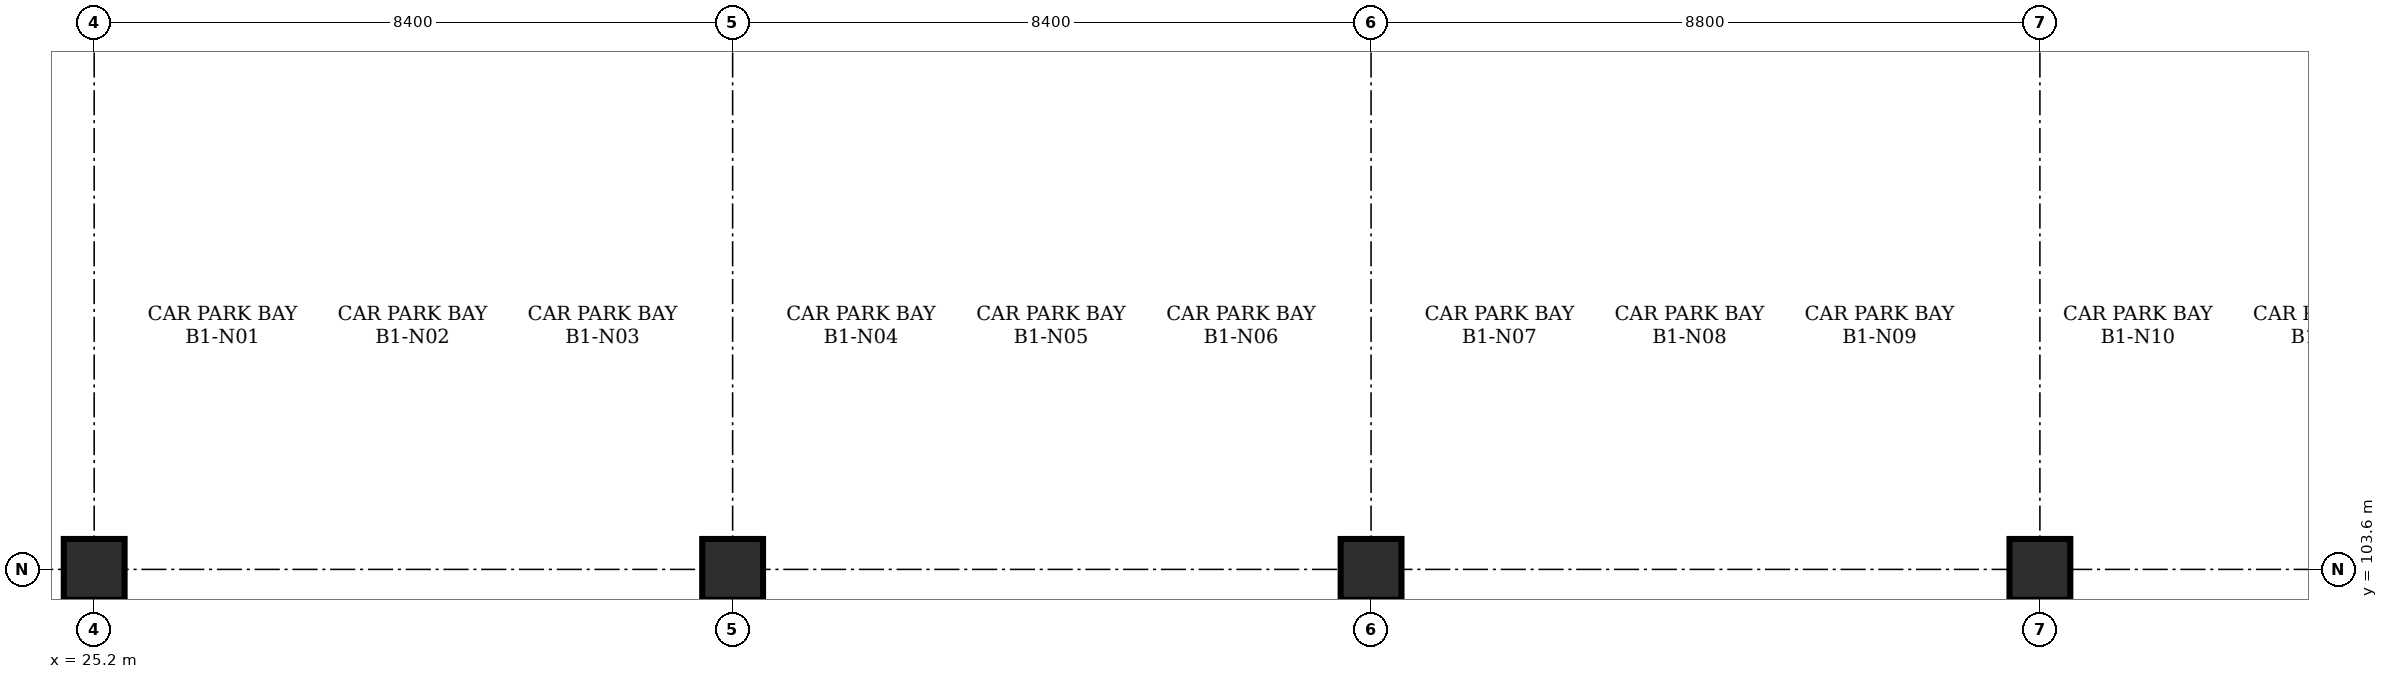
"""IFC4 building model, lengths in metres.
Left out: names, types, materials, properties, quantities, classifications, styles, units other than length and angle.
Written with IfcOpenShell. Run it as: python <this file> out.ifc"""

import sys

from ifc_helpers import new_model, si_unit, direction, frame, origin, origin_2d, place, context, subcontext, project, spatial, rectangle, extrude, element, save


model = new_model("IFC4")
c1 = context("Model", 3, precision=1e-05, world=origin(), true_north=direction((0.0, 1.0)))
c2 = subcontext(c1, "Body", "Model", "MODEL_VIEW")
j1 = project(units=[si_unit("LENGTHUNIT", "METRE"), si_unit("PLANEANGLEUNIT", "RADIAN")], contexts=[c1])
p1 = place(None, origin())
s1 = spatial("IfcSite", under=j1, at=p1, CompositionType="ELEMENT")
p2 = place(p1, origin())
s2 = spatial("IfcBuilding", under=s1, at=p2, CompositionType="ELEMENT")
p3 = place(p2, frame((0.0, 0.0, -4.8)))
s3 = spatial("IfcBuildingStorey", under=s2, at=p3, CompositionType="ELEMENT", Elevation=-4.8)
for number, where, z_axis, x_axis in (
    (1, (25.2, 103.6, 0.0), (0.0, 0.0, 1.0), (1.0, 0.0, 0.0)),
    (2, (33.6, 103.6, 0.0), (0.0, 0.0, 1.0), (1.0, 0.0, 0.0)),
    (3, (42.0, 103.6, 0.0), (0.0, 0.0, 1.0), (1.0, 0.0, 0.0)),
    (4, (50.8, 103.6, 0.0), (0.0, 0.0, 1.0), (1.0, 0.0, 0.0)),
):
    element("IfcColumn", number, at=place(p3, frame(where, z_axis=z_axis, x_axis=x_axis)), inside=s3, PredefinedType="COLUMN", context=c2, shape_type="SweptSolid", body=[
        extrude(rectangle(XDim=0.8, YDim=0.8, at=origin_2d()), origin(), (0.0, 0.0, 1.0), 4.395),
    ])
save(model, sys.argv[1])
